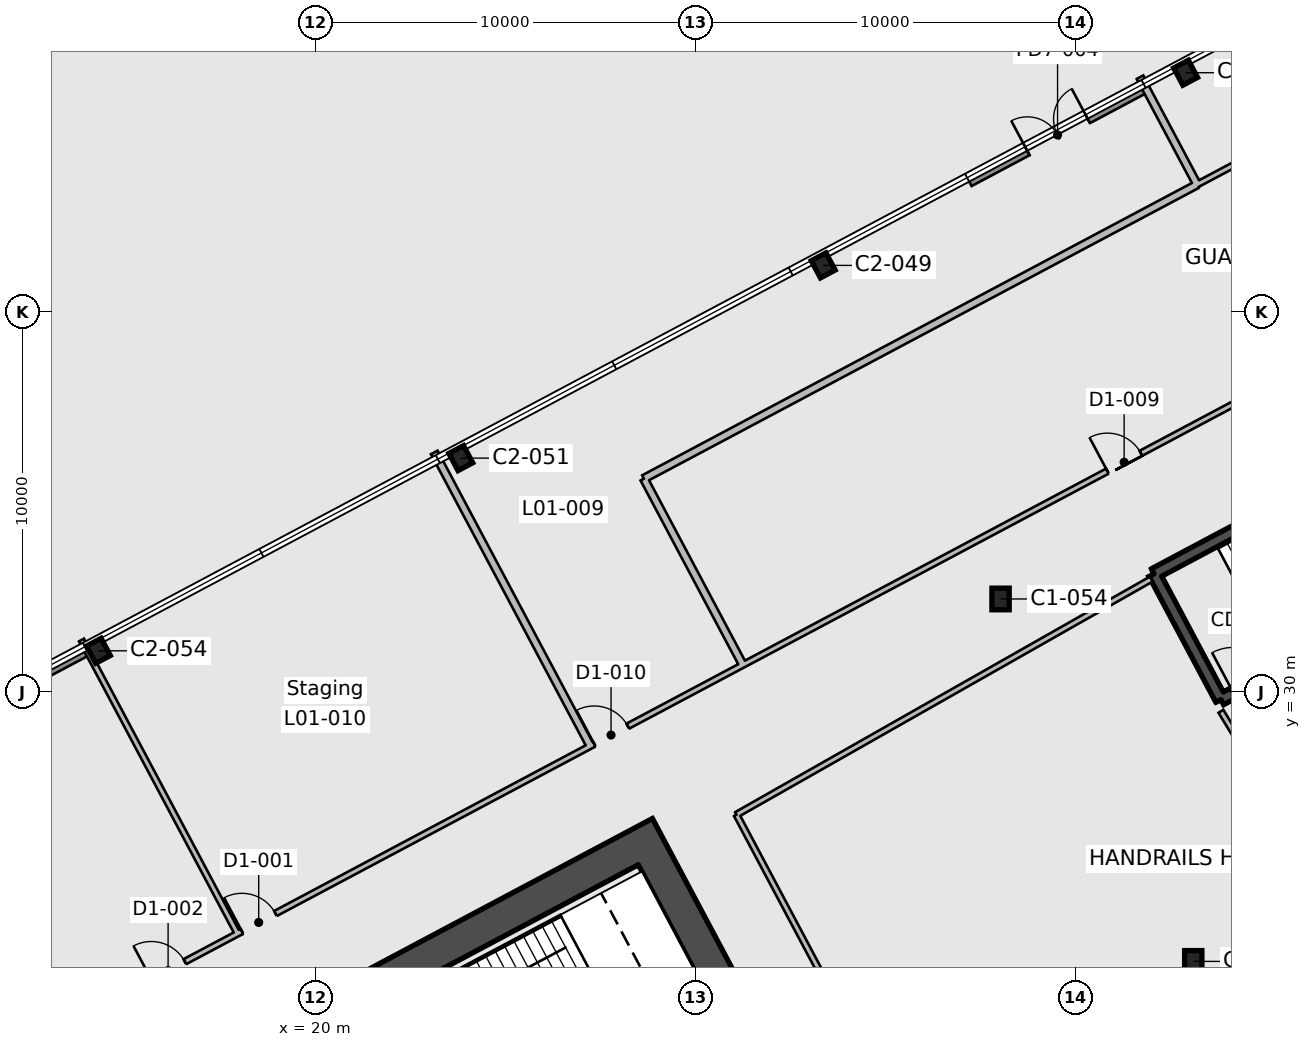
"""IFC4 building model, lengths in metres.
Left out: names, types, materials, properties, quantities, classifications, styles, units other than length and angle.
Written with IfcOpenShell. Run it as: python <this file> out.ifc"""

import sys

from ifc_helpers import new_model, si_unit, direction, frame, frame_2d, origin, origin_2d, place, context, subcontext, project, spatial, rectangle, i_section, extrude, element, fill, save


model = new_model("IFC4")
c1 = context("Model", 3, precision=1e-05, world=origin(), true_north=direction((0.0, 1.0)))
c2 = subcontext(c1, "Body", "Model", "MODEL_VIEW")
j1 = project(units=[si_unit("LENGTHUNIT", "METRE"), si_unit("PLANEANGLEUNIT", "RADIAN")], contexts=[c1])
p1 = place(None, origin())
s1 = spatial("IfcSite", under=j1, at=p1, CompositionType="ELEMENT")
p2 = place(p1, origin())
s2 = spatial("IfcBuilding", under=s1, at=p2, CompositionType="ELEMENT")
p3 = place(p2, frame((0.0, 0.0, 7.0)))
s3 = spatial("IfcBuildingStorey", under=s2, at=p3, CompositionType="ELEMENT", Elevation=7.0)
p4 = place(p3, frame((43.088, 22.91, 0.0), z_axis=(0.0, 0.0, 1.0), x_axis=(1.0, 0.0, 0.0)))
e1 = element("IfcColumn", 1, at=p4, inside=s3, PredefinedType="COLUMN", context=c2, shape_type="SweptSolid", body=[
    extrude(i_section(OverallWidth=0.455, OverallDepth=0.569, WebThickness=0.078, FlangeThickness=0.125, FilletRadius=0.015, at=origin_2d()), origin(), (0.0, 0.0, 1.0), 5.2),
])
p5 = place(p3, frame((14.279, 31.082, 0.0), z_axis=(0.0, 0.0, 1.0), x_axis=(-0.882947592859, -0.469471562786, 0.0)))
e2 = element("IfcColumn", 2, at=p5, inside=s3, PredefinedType="COLUMN", context=c2, shape_type="SweptSolid", body=[
    extrude(i_section(OverallWidth=0.437, OverallDepth=0.513, WebThickness=0.061, FlangeThickness=0.097, FilletRadius=0.015, at=origin_2d()), origin(), (0.0, 0.0, 1.0), 5.2),
])
p6 = place(p3, frame((38.018, 32.446, 0.0), z_axis=(0.0, 0.0, 1.0), x_axis=(1.0, 0.0, 0.0)))
e3 = element("IfcColumn", 3, at=p6, inside=s3, PredefinedType="COLUMN", context=c2, shape_type="SweptSolid", body=[
    extrude(i_section(OverallWidth=0.455, OverallDepth=0.569, WebThickness=0.078, FlangeThickness=0.125, FilletRadius=0.015, at=origin_2d()), origin(), (0.0, 0.0, 1.0), 5.2),
])
for number, where, z_axis, x_axis in (
    (4, (23.815, 36.152, 0.0), (0.0, 0.0, 1.0), (-0.883, -0.469, 0.0)),
    (5, (33.351, 41.223, 0.0), (0.0, 0.0, 1.0), (-0.883, -0.469, 0.0)),
    (6, (42.887, 46.293, 0.0), (0.0, 0.0, 1.0), (-0.883, -0.469, 0.0)),
):
    element("IfcColumn", number, at=place(p3, frame(where, z_axis=z_axis, x_axis=x_axis)), inside=s3, PredefinedType="COLUMN", context=c2, shape_type="SweptSolid", body=[
        extrude(i_section(OverallWidth=0.437, OverallDepth=0.513, WebThickness=0.061, FlangeThickness=0.097, FilletRadius=0.015, at=origin_2d()), origin(), (0.0, 0.0, 1.0), 5.2),
    ])
p7 = place(p3, frame((37.849, 8.799, 0.0), z_axis=(0.0, 0.0, 1.0), x_axis=(-0.469465789982, 0.882950662289, 0.0)))
e7 = element("IfcWall", 7, at=p7, inside=s3, PredefinedType="SHEAR", context=c2, shape_type="SweptSolid", body=[
    extrude(rectangle(XDim=20.0, YDim=0.9, at=frame_2d((10.0, 0.0))), origin(), (0.0, 0.0, 1.0), 5.2),
])
p8 = place(p7, frame((10.6, 0.0, 0.0)))
e8 = element("IfcOpeningElement", 8, at=p8, cuts=e7, PredefinedType="OPENING", context=c2, shape_type="SweptSolid", body=[
    extrude(rectangle(XDim=2.4, YDim=2.4, at=frame_2d((1.2, 1.2))), frame((0.0, 0.46, 0.0), z_axis=(0.0, -1.0, 0.0), x_axis=(1.0, 0.0, 0.0)), (0.0, 0.0, 1.0), 0.92),
])
p9 = place(p3, frame((10.438, 16.366, 0.0), z_axis=(0.0, 0.0, 1.0), x_axis=(0.88294509198, 0.469476266226, 0.0)))
e9 = element("IfcWall", 9, at=p9, inside=s3, PredefinedType="SHEAR", context=c2, shape_type="SweptSolid", body=[
    extrude(rectangle(XDim=20.2, YDim=0.9, at=frame_2d((10.1, 0.0))), origin(), (0.0, 0.0, 1.0), 5.2),
])
p10 = place(p3, frame((51.145, 33.693, 0.0), z_axis=(0.0, 0.0, 1.0), x_axis=(-0.882945809314, -0.469474917132, 0.0)))
e10 = element("IfcWall", 10, at=p10, inside=s3, PredefinedType="SHEAR", context=c2, shape_type="SweptSolid", body=[
    extrude(rectangle(XDim=8.3, YDim=0.3, at=frame_2d((4.15, 0.0))), origin(), (0.0, 0.0, 1.0), 5.2),
])
p11 = place(p10, frame((6.725, 0.0, 0.0)))
e11 = element("IfcOpeningElement", 11, at=p11, cuts=e10, PredefinedType="OPENING", context=c2, shape_type="SweptSolid", body=[
    extrude(rectangle(XDim=1.2, YDim=2.1, at=frame_2d((0.6, 1.05))), frame((0.0, 0.16, 0.0), z_axis=(0.0, -1.0, 0.0), x_axis=(1.0, 0.0, 0.0)), (0.0, 0.0, 1.0), 0.32),
])
p12 = place(p3, frame((43.816, 29.796, 0.0), z_axis=(0.0, 0.0, 1.0), x_axis=(-0.46946936446, 0.882948761726, 0.0)))
e12 = element("IfcWall", 12, at=p12, inside=s3, PredefinedType="SHEAR", context=c2, shape_type="SweptSolid", body=[
    extrude(rectangle(XDim=3.75, YDim=0.3, at=frame_2d((1.875, 0.0))), origin(), (0.0, 0.0, 1.0), 5.2),
])
p13 = place(p3, frame((42.055, 33.107, 0.0), z_axis=(0.0, 0.0, 1.0), x_axis=(0.882945809314, 0.469474917132, 0.0)))
e13 = element("IfcWall", 13, at=p13, inside=s3, PredefinedType="SHEAR", context=c2, shape_type="SweptSolid", body=[
    extrude(rectangle(XDim=8.3, YDim=0.3, at=frame_2d((4.15, 0.0))), origin(), (0.0, 0.0, 1.0), 5.2),
])
p14 = place(p3, frame((41.839, 45.888, 0.0), z_axis=(0.0, 0.0, 1.0), x_axis=(-0.882946113264, -0.469474345488, 0.0)))
e14 = element("IfcWall", 14, at=p14, inside=s3, PredefinedType="STANDARD", context=c2, shape_type="SweptSolid", body=[
    extrude(rectangle(XDim=5.258, YDim=0.25, at=frame_2d((2.629, 0.0))), origin(), (0.0, 0.0, 1.0), 3.612),
])
p15 = place(p14, frame((1.729, 0.0, 0.0)))
e15 = element("IfcOpeningElement", 15, at=p15, cuts=e14, PredefinedType="OPENING", context=c2, shape_type="SweptSolid", body=[
    extrude(rectangle(XDim=1.8, YDim=2.4, at=frame_2d((0.9, 1.2))), frame((0.0, 0.135, 0.0), z_axis=(0.0, -1.0, 0.0), x_axis=(1.0, 0.0, 0.0)), (0.0, 0.0, 1.0), 0.27),
])
p16 = place(p3, frame((13.985, 31.079, 0.0), z_axis=(0.0, 0.0, 1.0), x_axis=(-0.88293709965, -0.469491297111, 0.0)))
e16 = element("IfcWall", 16, at=p16, inside=s3, PredefinedType="STANDARD", context=c2, shape_type="SweptSolid", body=[
    extrude(rectangle(XDim=5.258, YDim=0.25, at=frame_2d((2.629, 0.0))), origin(), (0.0, 0.0, 1.0), 3.612),
])
p17 = place(p16, frame((1.729, 0.0, 0.0)))
e17 = element("IfcOpeningElement", 17, at=p17, cuts=e16, PredefinedType="OPENING", context=c2, shape_type="SweptSolid", body=[
    extrude(rectangle(XDim=1.8, YDim=2.4, at=frame_2d((0.9, 1.2))), frame((0.0, 0.135, 0.0), z_axis=(0.0, -1.0, 0.0), x_axis=(1.0, 0.0, 0.0)), (0.0, 0.0, 1.0), 0.27),
])
p18 = place(p3, frame((0.0, 14.1, 0.0), z_axis=(0.0, 0.0, 1.0), x_axis=(0.882942713919, 0.469480738623, 0.0)))
e18 = element("IfcWall", 18, at=p18, inside=s3, PredefinedType="PARTITIONING", context=c2, shape_type="SweptSolid", body=[
    extrude(rectangle(XDim=36.591, YDim=0.15, at=frame_2d((18.296, 0.0))), origin(), (0.0, 0.0, 1.0), 4.75),
])
p19 = place(p18, frame((30.95, 0.0, 0.0)))
e19 = element("IfcOpeningElement", 19, at=p19, cuts=e18, PredefinedType="OPENING", context=c2, shape_type="SweptSolid", body=[
    extrude(rectangle(XDim=1.0, YDim=2.1, at=frame_2d((0.5, 1.05))), frame((0.0, 0.085, 0.0), z_axis=(0.0, -1.0, 0.0), x_axis=(1.0, 0.0, 0.0)), (0.0, 0.0, 1.0), 0.17),
])
p20 = place(p18, frame((20.45, 0.0, 0.0)))
e20 = element("IfcOpeningElement", 20, at=p20, cuts=e18, PredefinedType="OPENING", context=c2, shape_type="SweptSolid", body=[
    extrude(rectangle(XDim=1.0, YDim=2.1, at=frame_2d((0.5, 1.05))), frame((0.0, 0.085, 0.0), z_axis=(0.0, -1.0, 0.0), x_axis=(1.0, 0.0, 0.0)), (0.0, 0.0, 1.0), 0.17),
])
p21 = place(p18, frame((17.75, 0.0, 0.0)))
e21 = element("IfcOpeningElement", 21, at=p21, cuts=e18, PredefinedType="OPENING", context=c2, shape_type="SweptSolid", body=[
    extrude(rectangle(XDim=1.0, YDim=2.1, at=frame_2d((0.5, 1.05))), frame((0.0, 0.085, 0.0), z_axis=(0.0, -1.0, 0.0), x_axis=(1.0, 0.0, 0.0)), (0.0, 0.0, 1.0), 0.17),
])
p22 = place(p3, frame((13.834, 31.366, 0.0), z_axis=(0.0, 0.0, 1.0), x_axis=(0.469374180568, -0.882999365014, 0.0)))
e22 = element("IfcWall", 22, at=p22, inside=s3, PredefinedType="PARTITIONING", context=c2, shape_type="SweptSolid", body=[
    extrude(rectangle(XDim=8.75, YDim=0.15, at=frame_2d((4.375, 0.0))), origin(), (0.0, 0.0, 1.0), 4.75),
])
p23 = place(p3, frame((23.117, 36.302, 0.0), z_axis=(0.0, 0.0, 1.0), x_axis=(0.469482945701, -0.882941540361, 0.0)))
e23 = element("IfcWall", 23, at=p23, inside=s3, PredefinedType="PARTITIONING", context=c2, shape_type="SweptSolid", body=[
    extrude(rectangle(XDim=8.75, YDim=0.2, at=frame_2d((4.375, 0.0))), origin(), (0.0, 0.0, 1.0), 4.75),
])
p24 = place(p3, frame((31.23, 30.726, 0.0), z_axis=(0.0, 0.0, 1.0), x_axis=(-0.469403649121, 0.882983699845, 0.0)))
e24 = element("IfcWall", 24, at=p24, inside=s3, PredefinedType="PARTITIONING", context=c2, shape_type="SweptSolid", body=[
    extrude(rectangle(XDim=5.532, YDim=0.2, at=frame_2d((2.766, 0.0))), origin(), (0.0, 0.0, 1.0), 4.75),
])
p25 = place(p3, frame((28.633, 35.611, 0.0), z_axis=(0.0, 0.0, 1.0), x_axis=(0.882947109015, 0.469472472762, 0.0)))
e25 = element("IfcWall", 25, at=p25, inside=s3, PredefinedType="PARTITIONING", context=c2, shape_type="SweptSolid", body=[
    extrude(rectangle(XDim=16.484, YDim=0.2, at=frame_2d((8.242, 0.0))), origin(), (0.0, 0.0, 1.0), 4.75),
])
p26 = place(p3, frame((32.308, 31.279, 0.0), z_axis=(0.0, 0.0, 1.0), x_axis=(0.882939951573, 0.469485933673, 0.0)))
e26 = element("IfcWall", 26, at=p26, inside=s3, PredefinedType="PARTITIONING", context=c2, shape_type="SweptSolid", body=[
    extrude(rectangle(XDim=20.239, YDim=0.15, at=frame_2d((10.12, 0.0))), origin(), (0.0, 0.0, 1.0), 4.75),
])
p27 = place(p26, frame((9.65, 0.0, 0.0)))
e27 = element("IfcOpeningElement", 27, at=p27, cuts=e26, PredefinedType="OPENING", context=c2, shape_type="SweptSolid", body=[
    extrude(rectangle(XDim=1.0, YDim=2.1, at=frame_2d((0.5, 1.05))), frame((0.0, 0.085, 0.0), z_axis=(0.0, -1.0, 0.0), x_axis=(1.0, 0.0, 0.0)), (0.0, 0.0, 1.0), 0.17),
])
p28 = place(p3, frame((39.567, 10.788, 0.0), z_axis=(0.0, 0.0, 1.0), x_axis=(-0.469474056812, 0.882946266757, 0.0)))
e28 = element("IfcWall", 28, at=p28, inside=s3, PredefinedType="PARTITIONING", context=c2, shape_type="SweptSolid", body=[
    extrude(rectangle(XDim=18.101, YDim=0.15, at=frame_2d((9.05, 0.0))), origin(), (0.0, 0.0, 1.0), 4.75),
])
p29 = place(p28, frame((8.55, 0.0, 0.0)))
e29 = element("IfcOpeningElement", 29, at=p29, cuts=e28, PredefinedType="OPENING", context=c2, shape_type="SweptSolid", body=[
    extrude(rectangle(XDim=1.0, YDim=2.1, at=frame_2d((0.5, 1.05))), frame((0.0, 0.085, 0.0), z_axis=(0.0, -1.0, 0.0), x_axis=(1.0, 0.0, 0.0)), (0.0, 0.0, 1.0), 0.17),
])
p30 = place(p3, frame((31.069, 26.77, 0.0), z_axis=(0.0, 0.0, 1.0), x_axis=(0.86954617394, 0.493851649168, 0.0)))
e30 = element("IfcWall", 30, at=p30, inside=s3, PredefinedType="PARTITIONING", context=c2, shape_type="SweptSolid", body=[
    extrude(rectangle(XDim=12.55, YDim=0.15, at=frame_2d((6.275, 0.0))), origin(), (0.0, 0.0, 1.0), 4.75),
])
p31 = place(p3, frame((41.686, 46.175, 0.0), z_axis=(0.0, 0.0, 1.0), x_axis=(0.469447181805, -0.882960556025, 0.0)))
e31 = element("IfcWall", 31, at=p31, inside=s3, PredefinedType="PARTITIONING", context=c2, shape_type="SweptSolid", body=[
    extrude(rectangle(XDim=3.199, YDim=0.2, at=frame_2d((1.6, 0.0))), origin(), (0.0, 0.0, 1.0), 4.75),
])
p32 = place(p3, frame((43.188, 43.35, 0.0), z_axis=(0.0, 0.0, 1.0), x_axis=(0.882979828545, 0.469410931256, 0.0)))
e32 = element("IfcWall", 32, at=p32, inside=s3, PredefinedType="PARTITIONING", context=c2, shape_type="SweptSolid", body=[
    extrude(rectangle(XDim=7.515, YDim=0.15, at=frame_2d((3.758, 0.0))), origin(), (0.0, 0.0, 1.0), 4.75),
])
p33 = place(p3, frame((43.816, 29.491, 0.0), z_axis=(0.0, 0.0, 1.0), x_axis=(0.518473208291, -0.855093873376, 0.0)))
e33 = element("IfcWall", 33, at=p33, inside=s3, PredefinedType="PARTITIONING", context=c2, shape_type="SweptSolid", body=[
    extrude(rectangle(XDim=1.325, YDim=0.15, at=frame_2d((0.663, 0.0))), origin(), (0.0, 0.0, 1.0), 4.75),
])
p34 = place(p15, frame((1.8, 0.0, 0.0), z_axis=(0.0, 0.0, 1.0), x_axis=(-1.0, 0.0, 0.0)))
e34 = element("IfcDoor", 34, at=p34, inside=s3, OperationType="DOUBLE_DOOR_SINGLE_SWING", PredefinedType="DOOR", context=c2, shape_type="SweptSolid", body=[
    extrude(rectangle(XDim=1.8, YDim=2.4, at=frame_2d((0.9, 1.2))), frame((0.0, 0.025, 0.0), z_axis=(0.0, -1.0, 0.0), x_axis=(1.0, 0.0, 0.0)), (0.0, 0.0, 1.0), 0.05),
])
fill(e15, e34)
p35 = place(p27, origin())
e35 = element("IfcDoor", 35, at=p35, inside=s3, OperationType="SINGLE_SWING_LEFT", PredefinedType="DOOR", context=c2, shape_type="SweptSolid", body=[
    extrude(rectangle(XDim=1.0, YDim=2.1, at=frame_2d((0.5, 1.05))), frame((0.0, 0.025, 0.0), z_axis=(0.0, -1.0, 0.0), x_axis=(1.0, 0.0, 0.0)), (0.0, 0.0, 1.0), 0.05),
])
fill(e27, e35)
p36 = place(p19, origin())
e36 = element("IfcDoor", 36, at=p36, inside=s3, OperationType="SINGLE_SWING_LEFT", PredefinedType="DOOR", context=c2, shape_type="SweptSolid", body=[
    extrude(rectangle(XDim=1.0, YDim=2.1, at=frame_2d((0.5, 1.05))), frame((0.0, 0.025, 0.0), z_axis=(0.0, -1.0, 0.0), x_axis=(1.0, 0.0, 0.0)), (0.0, 0.0, 1.0), 0.05),
])
fill(e19, e36)
p37 = place(p20, origin())
e37 = element("IfcDoor", 37, at=p37, inside=s3, OperationType="SINGLE_SWING_LEFT", PredefinedType="DOOR", context=c2, shape_type="SweptSolid", body=[
    extrude(rectangle(XDim=1.0, YDim=2.1, at=frame_2d((0.5, 1.05))), frame((0.0, 0.025, 0.0), z_axis=(0.0, -1.0, 0.0), x_axis=(1.0, 0.0, 0.0)), (0.0, 0.0, 1.0), 0.05),
])
fill(e20, e37)
p38 = place(p21, origin())
e38 = element("IfcDoor", 38, at=p38, inside=s3, OperationType="SINGLE_SWING_LEFT", PredefinedType="DOOR", context=c2, shape_type="SweptSolid", body=[
    extrude(rectangle(XDim=1.0, YDim=2.1, at=frame_2d((0.5, 1.05))), frame((0.0, 0.025, 0.0), z_axis=(0.0, -1.0, 0.0), x_axis=(1.0, 0.0, 0.0)), (0.0, 0.0, 1.0), 0.05),
])
fill(e21, e38)
save(model, sys.argv[1])
